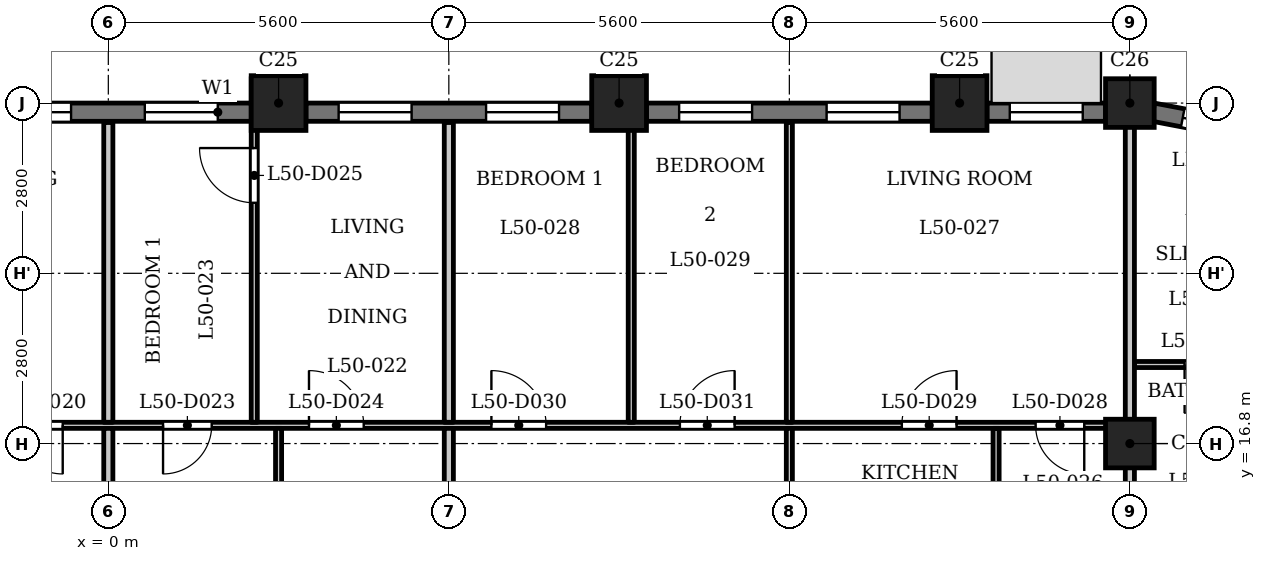
"""IFC4 building model, lengths in metres.
Left out: names, types, materials, properties, quantities, classifications, styles, units other than length and angle.
Written with IfcOpenShell. Run it as: python <this file> out.ifc"""

import sys

from ifc_helpers import new_model, si_unit, direction, frame, frame_2d, origin, origin_2d, place, context, subcontext, project, spatial, rectangle, extrude, element, fill, save


model = new_model("IFC4")
c1 = context("Model", 3, precision=1e-05, world=origin(), true_north=direction((0.0, 1.0)))
c2 = subcontext(c1, "Body", "Model", "MODEL_VIEW")
j1 = project(units=[si_unit("LENGTHUNIT", "METRE"), si_unit("PLANEANGLEUNIT", "RADIAN")], contexts=[c1])
p1 = place(None, origin())
s1 = spatial("IfcSite", under=j1, at=p1, CompositionType="ELEMENT")
p2 = place(p1, origin())
s2 = spatial("IfcBuilding", under=s1, at=p2, CompositionType="ELEMENT")
p3 = place(p2, frame((0.0, 0.0, 195.9)))
s3 = spatial("IfcBuildingStorey", under=s2, at=p3, CompositionType="ELEMENT", Elevation=195.9)
for number, where, z_axis, x_axis in (
    (1, (14.0, 22.4, 0.0), (0.0, 0.0, 1.0), (1.0, 0.0, 0.0)),
    (2, (8.4, 22.4, 0.0), (0.0, 0.0, 1.0), (1.0, 0.0, 0.0)),
    (3, (2.8, 22.4, 0.0), (0.0, 0.0, 1.0), (1.0, 0.0, 0.0)),
):
    element("IfcColumn", number, at=place(p3, frame(where, z_axis=z_axis, x_axis=x_axis)), inside=s3, PredefinedType="COLUMN", context=c2, shape_type="SweptSolid", body=[
        extrude(rectangle(XDim=0.9, YDim=0.9, at=origin_2d()), origin(), (0.0, 0.0, 1.0), 3.5),
    ])
for number, where, z_axis, x_axis in (
    (4, (16.8, 16.8, 0.0), (0.0, 0.0, 1.0), (1.0, 0.0, 0.0)),
    (5, (16.8, 22.4, 0.0), (0.0, 0.0, 1.0), (1.0, 0.0, 0.0)),
):
    element("IfcColumn", number, at=place(p3, frame(where, z_axis=z_axis, x_axis=x_axis)), inside=s3, PredefinedType="COLUMN", context=c2, shape_type="SweptSolid", body=[
        extrude(rectangle(XDim=0.8, YDim=0.8, at=origin_2d()), origin(), (0.0, 0.0, 1.0), 3.5),
    ])
p4 = place(p3, frame((18.946, 21.914, 0.0), z_axis=(0.0, 0.0, 1.0), x_axis=(-0.98230529033, 0.187286722942, 0.0)))
e6 = element("IfcWall", 6, at=p4, inside=s3, PredefinedType="SOLIDWALL", context=c2, shape_type="SweptSolid", body=[
    extrude(rectangle(XDim=1.799, YDim=0.3, at=frame_2d((0.899, 0.0))), origin(), (0.0, 0.0, 1.0), 2.5),
])
p5 = place(p4, frame((0.5, 0.0, 0.6)))
e7 = element("IfcOpeningElement", 7, at=p5, cuts=e6, PredefinedType="OPENING", context=c2, shape_type="SweptSolid", body=[
    extrude(rectangle(XDim=0.8, YDim=1.55, at=frame_2d((0.4, 0.775))), frame((0.0, 0.16, 0.0), z_axis=(0.0, -1.0, 0.0), x_axis=(1.0, 0.0, 0.0)), (0.0, 0.0, 1.0), 0.32),
])
p6 = place(p3, frame((16.4, 22.25, 0.0), z_axis=(0.0, 0.0, 1.0), x_axis=(-1.0, 0.0, 0.0)))
e8 = element("IfcWall", 8, at=p6, inside=s3, PredefinedType="SOLIDWALL", context=c2, shape_type="SweptSolid", body=[
    extrude(rectangle(XDim=1.95, YDim=0.3, at=frame_2d((0.975, 0.0))), origin(), (0.0, 0.0, 1.0), 2.5),
])
p7 = place(p6, frame((0.375, 0.0, 0.6)))
e9 = element("IfcOpeningElement", 9, at=p7, cuts=e8, PredefinedType="OPENING", context=c2, shape_type="SweptSolid", body=[
    extrude(rectangle(XDim=1.2, YDim=1.55, at=frame_2d((0.6, 0.775))), frame((0.0, 0.16, 0.0), z_axis=(0.0, -1.0, 0.0), x_axis=(1.0, 0.0, 0.0)), (0.0, 0.0, 1.0), 0.32),
])
p8 = place(p3, frame((13.55, 22.25, 0.0), z_axis=(0.0, 0.0, 1.0), x_axis=(-1.0, 0.0, 0.0)))
e10 = element("IfcWall", 10, at=p8, inside=s3, PredefinedType="SOLIDWALL", context=c2, shape_type="SweptSolid", body=[
    extrude(rectangle(XDim=4.7, YDim=0.3, at=frame_2d((2.35, 0.0))), origin(), (0.0, 0.0, 1.0), 2.5),
])
p9 = place(p8, frame((0.538, 0.0, 0.6)))
e11 = element("IfcOpeningElement", 11, at=p9, cuts=e10, PredefinedType="OPENING", context=c2, shape_type="SweptSolid", body=[
    extrude(rectangle(XDim=1.2, YDim=1.55, at=frame_2d((0.6, 0.775))), frame((0.0, 0.16, 0.0), z_axis=(0.0, -1.0, 0.0), x_axis=(1.0, 0.0, 0.0)), (0.0, 0.0, 1.0), 0.32),
])
p10 = place(p8, frame((2.962, 0.0, 0.6)))
e12 = element("IfcOpeningElement", 12, at=p10, cuts=e10, PredefinedType="OPENING", context=c2, shape_type="SweptSolid", body=[
    extrude(rectangle(XDim=1.2, YDim=1.55, at=frame_2d((0.6, 0.775))), frame((0.0, 0.16, 0.0), z_axis=(0.0, -1.0, 0.0), x_axis=(1.0, 0.0, 0.0)), (0.0, 0.0, 1.0), 0.32),
])
p11 = place(p3, frame((7.95, 22.25, 0.0), z_axis=(0.0, 0.0, 1.0), x_axis=(-1.0, 0.0, 0.0)))
e13 = element("IfcWall", 13, at=p11, inside=s3, PredefinedType="SOLIDWALL", context=c2, shape_type="SweptSolid", body=[
    extrude(rectangle(XDim=4.7, YDim=0.3, at=frame_2d((2.35, 0.0))), origin(), (0.0, 0.0, 1.0), 2.5),
])
p12 = place(p11, frame((0.538, 0.0, 0.6)))
e14 = element("IfcOpeningElement", 14, at=p12, cuts=e13, PredefinedType="OPENING", context=c2, shape_type="SweptSolid", body=[
    extrude(rectangle(XDim=1.2, YDim=1.55, at=frame_2d((0.6, 0.775))), frame((0.0, 0.16, 0.0), z_axis=(0.0, -1.0, 0.0), x_axis=(1.0, 0.0, 0.0)), (0.0, 0.0, 1.0), 0.32),
])
p13 = place(p11, frame((2.962, 0.0, 0.6)))
e15 = element("IfcOpeningElement", 15, at=p13, cuts=e13, PredefinedType="OPENING", context=c2, shape_type="SweptSolid", body=[
    extrude(rectangle(XDim=1.2, YDim=1.55, at=frame_2d((0.6, 0.775))), frame((0.0, 0.16, 0.0), z_axis=(0.0, -1.0, 0.0), x_axis=(1.0, 0.0, 0.0)), (0.0, 0.0, 1.0), 0.32),
])
p14 = place(p3, frame((2.35, 22.25, 0.0), z_axis=(0.0, 0.0, 1.0), x_axis=(-1.0, 0.0, 0.0)))
e16 = element("IfcWall", 16, at=p14, inside=s3, PredefinedType="SOLIDWALL", context=c2, shape_type="SweptSolid", body=[
    extrude(rectangle(XDim=4.7, YDim=0.3, at=frame_2d((2.35, 0.0))), origin(), (0.0, 0.0, 1.0), 2.5),
])
p15 = place(p14, frame((0.55, 0.0, 0.6)))
e17 = element("IfcOpeningElement", 17, at=p15, cuts=e16, PredefinedType="OPENING", context=c2, shape_type="SweptSolid", body=[
    extrude(rectangle(XDim=1.2, YDim=1.55, at=frame_2d((0.6, 0.775))), frame((0.0, 0.16, 0.0), z_axis=(0.0, -1.0, 0.0), x_axis=(1.0, 0.0, 0.0)), (0.0, 0.0, 1.0), 0.32),
])
p16 = place(p14, frame((2.962, 0.0, 0.6)))
e18 = element("IfcOpeningElement", 18, at=p16, cuts=e16, PredefinedType="OPENING", context=c2, shape_type="SweptSolid", body=[
    extrude(rectangle(XDim=1.2, YDim=1.55, at=frame_2d((0.6, 0.775))), frame((0.0, 0.16, 0.0), z_axis=(0.0, -1.0, 0.0), x_axis=(1.0, 0.0, 0.0)), (0.0, 0.0, 1.0), 0.32),
])
p17 = place(p3, frame((-16.725, 17.1, 0.0), z_axis=(0.0, 0.0, 1.0), x_axis=(1.0, 0.0, 0.0)))
e19 = element("IfcWall", 19, at=p17, inside=s3, PredefinedType="PARTITIONING", context=c2, shape_type="SweptSolid", body=[
    extrude(rectangle(XDim=33.45, YDim=0.1, at=frame_2d((16.725, 0.0))), origin(), (0.0, 0.0, 1.0), 3.2),
])
p18 = place(p17, frame((4.075, 0.0, 0.0)))
e20 = element("IfcOpeningElement", 20, at=p18, cuts=e19, PredefinedType="OPENING", context=c2, shape_type="SweptSolid", body=[
    extrude(rectangle(XDim=0.8, YDim=2.1, at=frame_2d((0.4, 1.05))), frame((0.0, 0.06, 0.0), z_axis=(0.0, -1.0, 0.0), x_axis=(1.0, 0.0, 0.0)), (0.0, 0.0, 1.0), 0.12),
])
p19 = place(p17, frame((9.575, 0.0, 0.0)))
e21 = element("IfcOpeningElement", 21, at=p19, cuts=e19, PredefinedType="OPENING", context=c2, shape_type="SweptSolid", body=[
    extrude(rectangle(XDim=0.9, YDim=2.1, at=frame_2d((0.45, 1.05))), frame((0.0, 0.06, 0.0), z_axis=(0.0, -1.0, 0.0), x_axis=(1.0, 0.0, 0.0)), (0.0, 0.0, 1.0), 0.12),
])
p20 = place(p17, frame((15.175, 0.0, 0.0)))
e22 = element("IfcOpeningElement", 22, at=p20, cuts=e19, PredefinedType="OPENING", context=c2, shape_type="SweptSolid", body=[
    extrude(rectangle(XDim=0.8, YDim=2.1, at=frame_2d((0.4, 1.05))), frame((0.0, 0.06, 0.0), z_axis=(0.0, -1.0, 0.0), x_axis=(1.0, 0.0, 0.0)), (0.0, 0.0, 1.0), 0.12),
])
p21 = place(p17, frame((12.975, 0.0, 0.0)))
e23 = element("IfcOpeningElement", 23, at=p21, cuts=e19, PredefinedType="OPENING", context=c2, shape_type="SweptSolid", body=[
    extrude(rectangle(XDim=0.9, YDim=2.1, at=frame_2d((0.45, 1.05))), frame((0.0, 0.06, 0.0), z_axis=(0.0, -1.0, 0.0), x_axis=(1.0, 0.0, 0.0)), (0.0, 0.0, 1.0), 0.12),
])
p22 = place(p17, frame((17.625, 0.0, 0.0)))
e24 = element("IfcOpeningElement", 24, at=p22, cuts=e19, PredefinedType="OPENING", context=c2, shape_type="SweptSolid", body=[
    extrude(rectangle(XDim=0.8, YDim=2.1, at=frame_2d((0.4, 1.05))), frame((0.0, 0.06, 0.0), z_axis=(0.0, -1.0, 0.0), x_axis=(1.0, 0.0, 0.0)), (0.0, 0.0, 1.0), 0.12),
])
p23 = place(p17, frame((20.025, 0.0, 0.0)))
e25 = element("IfcOpeningElement", 25, at=p23, cuts=e19, PredefinedType="OPENING", context=c2, shape_type="SweptSolid", body=[
    extrude(rectangle(XDim=0.9, YDim=2.1, at=frame_2d((0.45, 1.05))), frame((0.0, 0.06, 0.0), z_axis=(0.0, -1.0, 0.0), x_axis=(1.0, 0.0, 0.0)), (0.0, 0.0, 1.0), 0.12),
])
p24 = place(p17, frame((31.975, 0.0, 0.0)))
e26 = element("IfcOpeningElement", 26, at=p24, cuts=e19, PredefinedType="OPENING", context=c2, shape_type="SweptSolid", body=[
    extrude(rectangle(XDim=0.8, YDim=2.1, at=frame_2d((0.4, 1.05))), frame((0.0, 0.06, 0.0), z_axis=(0.0, -1.0, 0.0), x_axis=(1.0, 0.0, 0.0)), (0.0, 0.0, 1.0), 0.12),
])
p25 = place(p17, frame((29.775, 0.0, 0.0)))
e27 = element("IfcOpeningElement", 27, at=p25, cuts=e19, PredefinedType="OPENING", context=c2, shape_type="SweptSolid", body=[
    extrude(rectangle(XDim=0.9, YDim=2.1, at=frame_2d((0.45, 1.05))), frame((0.0, 0.06, 0.0), z_axis=(0.0, -1.0, 0.0), x_axis=(1.0, 0.0, 0.0)), (0.0, 0.0, 1.0), 0.12),
])
p26 = place(p17, frame((23.025, 0.0, 0.0)))
e28 = element("IfcOpeningElement", 28, at=p26, cuts=e19, PredefinedType="OPENING", context=c2, shape_type="SweptSolid", body=[
    extrude(rectangle(XDim=0.9, YDim=2.1, at=frame_2d((0.45, 1.05))), frame((0.0, 0.06, 0.0), z_axis=(0.0, -1.0, 0.0), x_axis=(1.0, 0.0, 0.0)), (0.0, 0.0, 1.0), 0.12),
])
p27 = place(p17, frame((26.125, 0.0, 0.0)))
e29 = element("IfcOpeningElement", 29, at=p27, cuts=e19, PredefinedType="OPENING", context=c2, shape_type="SweptSolid", body=[
    extrude(rectangle(XDim=0.9, YDim=2.1, at=frame_2d((0.45, 1.05))), frame((0.0, 0.06, 0.0), z_axis=(0.0, -1.0, 0.0), x_axis=(1.0, 0.0, 0.0)), (0.0, 0.0, 1.0), 0.12),
])
p28 = place(p3, frame((16.875, 18.1, 0.0), z_axis=(0.0, 0.0, 1.0), x_axis=(1.0, 0.0, 0.0)))
e30 = element("IfcWall", 30, at=p28, inside=s3, PredefinedType="PARTITIONING", context=c2, shape_type="SweptSolid", body=[
    extrude(rectangle(XDim=6.515, YDim=0.1, at=frame_2d((3.258, 0.0))), origin(), (0.0, 0.0, 1.0), 3.2),
])
p29 = place(p28, frame((0.825, 0.0, 0.0)))
e31 = element("IfcOpeningElement", 31, at=p29, cuts=e30, PredefinedType="OPENING", context=c2, shape_type="SweptSolid", body=[
    extrude(rectangle(XDim=0.8, YDim=2.1, at=frame_2d((0.4, 1.05))), frame((0.0, 0.06, 0.0), z_axis=(0.0, -1.0, 0.0), x_axis=(1.0, 0.0, 0.0)), (0.0, 0.0, 1.0), 0.12),
])
p30 = place(p28, frame((3.239, 0.0, 0.0)))
e32 = element("IfcOpeningElement", 32, at=p30, cuts=e30, PredefinedType="OPENING", context=c2, shape_type="SweptSolid", body=[
    extrude(rectangle(XDim=0.9, YDim=2.1, at=frame_2d((0.45, 1.05))), frame((0.0, 0.06, 0.0), z_axis=(0.0, -1.0, 0.0), x_axis=(1.0, 0.0, 0.0)), (0.0, 0.0, 1.0), 0.12),
])
p31 = place(p3, frame((0.0, 13.275, 0.0), z_axis=(0.0, 0.0, 1.0), x_axis=(0.0, 1.0, 0.0)))
e33 = element("IfcWall", 33, at=p31, inside=s3, PredefinedType="PARTITIONING", context=c2, shape_type="SweptSolid", body=[
    extrude(rectangle(XDim=3.775, YDim=0.15, at=frame_2d((1.888, 0.0))), origin(), (0.0, 0.0, 1.0), 3.2),
])
p32 = place(p3, frame((0.0, 17.15, 0.0), z_axis=(0.0, 0.0, 1.0), x_axis=(0.0, 1.0, 0.0)))
e34 = element("IfcWall", 34, at=p32, inside=s3, PredefinedType="PARTITIONING", context=c2, shape_type="SweptSolid", body=[
    extrude(rectangle(XDim=4.93, YDim=0.15, at=frame_2d((2.465, 0.0))), origin(), (0.0, 0.0, 1.0), 3.2),
])
p33 = place(p3, frame((2.4, 17.15, 0.0), z_axis=(0.0, 0.0, 1.0), x_axis=(0.0, 1.0, 0.0)))
e35 = element("IfcWall", 35, at=p33, inside=s3, PredefinedType="PARTITIONING", context=c2, shape_type="SweptSolid", body=[
    extrude(rectangle(XDim=5.68, YDim=0.1, at=frame_2d((2.84, 0.0))), origin(), (0.0, 0.0, 1.0), 3.2),
])
p34 = place(p33, frame((3.61, 0.0, 0.0)))
e36 = element("IfcOpeningElement", 36, at=p34, cuts=e35, PredefinedType="OPENING", context=c2, shape_type="SweptSolid", body=[
    extrude(rectangle(XDim=0.9, YDim=2.1, at=frame_2d((0.45, 1.05))), frame((0.0, 0.06, 0.0), z_axis=(0.0, -1.0, 0.0), x_axis=(1.0, 0.0, 0.0)), (0.0, 0.0, 1.0), 0.12),
])
p35 = place(p3, frame((2.8, 13.275, 0.0), z_axis=(0.0, 0.0, 1.0), x_axis=(0.0, 1.0, 0.0)))
e37 = element("IfcWall", 37, at=p35, inside=s3, PredefinedType="PARTITIONING", context=c2, shape_type="SweptSolid", body=[
    extrude(rectangle(XDim=3.775, YDim=0.1, at=frame_2d((1.888, 0.0))), origin(), (0.0, 0.0, 1.0), 3.2),
])
p36 = place(p3, frame((5.6, 13.275, 0.0), z_axis=(0.0, 0.0, 1.0), x_axis=(0.0, 1.0, 0.0)))
e38 = element("IfcWall", 38, at=p36, inside=s3, PredefinedType="PARTITIONING", context=c2, shape_type="SweptSolid", body=[
    extrude(rectangle(XDim=3.775, YDim=0.15, at=frame_2d((1.888, 0.0))), origin(), (0.0, 0.0, 1.0), 3.2),
])
p37 = place(p3, frame((5.6, 17.15, 0.0), z_axis=(0.0, 0.0, 1.0), x_axis=(0.0, 1.0, 0.0)))
e39 = element("IfcWall", 39, at=p37, inside=s3, PredefinedType="PARTITIONING", context=c2, shape_type="SweptSolid", body=[
    extrude(rectangle(XDim=4.93, YDim=0.15, at=frame_2d((2.465, 0.0))), origin(), (0.0, 0.0, 1.0), 3.2),
])
p38 = place(p3, frame((8.6, 17.15, 0.0), z_axis=(0.0, 0.0, 1.0), x_axis=(0.0, 1.0, 0.0)))
e40 = element("IfcWall", 40, at=p38, inside=s3, PredefinedType="PARTITIONING", context=c2, shape_type="SweptSolid", body=[
    extrude(rectangle(XDim=5.68, YDim=0.1, at=frame_2d((2.84, 0.0))), origin(), (0.0, 0.0, 1.0), 3.2),
])
p39 = place(p3, frame((11.2, 13.275, 0.0), z_axis=(0.0, 0.0, 1.0), x_axis=(0.0, 1.0, 0.0)))
e41 = element("IfcWall", 41, at=p39, inside=s3, PredefinedType="PARTITIONING", context=c2, shape_type="SweptSolid", body=[
    extrude(rectangle(XDim=3.775, YDim=0.1, at=frame_2d((1.888, 0.0))), origin(), (0.0, 0.0, 1.0), 3.2),
])
p40 = place(p39, frame((0.576, 0.0, 0.0)))
e42 = element("IfcOpeningElement", 42, at=p40, cuts=e41, PredefinedType="OPENING", context=c2, shape_type="SweptSolid", body=[
    extrude(rectangle(XDim=0.9, YDim=2.1, at=frame_2d((0.45, 1.05))), frame((0.0, 0.06, 0.0), z_axis=(0.0, -1.0, 0.0), x_axis=(1.0, 0.0, 0.0)), (0.0, 0.0, 1.0), 0.12),
])
p41 = place(p3, frame((11.2, 17.15, 0.0), z_axis=(0.0, 0.0, 1.0), x_axis=(0.0, 1.0, 0.0)))
e43 = element("IfcWall", 43, at=p41, inside=s3, PredefinedType="PARTITIONING", context=c2, shape_type="SweptSolid", body=[
    extrude(rectangle(XDim=4.93, YDim=0.1, at=frame_2d((2.465, 0.0))), origin(), (0.0, 0.0, 1.0), 3.2),
])
p42 = place(p3, frame((14.6, 13.275, 0.0), z_axis=(0.0, 0.0, 1.0), x_axis=(0.0, 1.0, 0.0)))
e44 = element("IfcWall", 44, at=p42, inside=s3, PredefinedType="PARTITIONING", context=c2, shape_type="SweptSolid", body=[
    extrude(rectangle(XDim=3.775, YDim=0.1, at=frame_2d((1.888, 0.0))), origin(), (0.0, 0.0, 1.0), 3.2),
])
p43 = place(p3, frame((16.8, 15.475, 0.0), z_axis=(0.0, 0.0, 1.0), x_axis=(0.0, 1.0, 0.0)))
e45 = element("IfcWall", 45, at=p43, inside=s3, PredefinedType="PARTITIONING", context=c2, shape_type="SweptSolid", body=[
    extrude(rectangle(XDim=6.835, YDim=0.15, at=frame_2d((3.417, 0.0))), origin(), (0.0, 0.0, 1.0), 2.55),
])
p44 = place(p20, origin())
e46 = element("IfcDoor", 46, at=p44, inside=s3, OperationType="SINGLE_SWING_RIGHT", PredefinedType="DOOR", context=c2, shape_type="SweptSolid", body=[
    extrude(rectangle(XDim=0.8, YDim=2.1, at=frame_2d((0.4, 1.05))), frame((0.0, 0.025, 0.0), z_axis=(0.0, -1.0, 0.0), x_axis=(1.0, 0.0, 0.0)), (0.0, 0.0, 1.0), 0.05),
])
fill(e22, e46)
p45 = place(p22, origin())
e47 = element("IfcDoor", 47, at=p45, inside=s3, OperationType="SINGLE_SWING_LEFT", PredefinedType="DOOR", context=c2, shape_type="SweptSolid", body=[
    extrude(rectangle(XDim=0.8, YDim=2.1, at=frame_2d((0.4, 1.05))), frame((0.0, 0.025, 0.0), z_axis=(0.0, -1.0, 0.0), x_axis=(1.0, 0.0, 0.0)), (0.0, 0.0, 1.0), 0.05),
])
fill(e24, e47)
p46 = place(p23, origin())
e48 = element("IfcDoor", 48, at=p46, inside=s3, OperationType="SINGLE_SWING_RIGHT", PredefinedType="DOOR", context=c2, shape_type="SweptSolid", body=[
    extrude(rectangle(XDim=0.9, YDim=2.1, at=frame_2d((0.45, 1.05))), frame((0.0, 0.025, 0.0), z_axis=(0.0, -1.0, 0.0), x_axis=(1.0, 0.0, 0.0)), (0.0, 0.0, 1.0), 0.05),
])
fill(e25, e48)
p47 = place(p34, origin())
e49 = element("IfcDoor", 49, at=p47, inside=s3, OperationType="SINGLE_SWING_LEFT", PredefinedType="DOOR", context=c2, shape_type="SweptSolid", body=[
    extrude(rectangle(XDim=0.9, YDim=2.1, at=frame_2d((0.45, 1.05))), frame((0.0, 0.025, 0.0), z_axis=(0.0, -1.0, 0.0), x_axis=(1.0, 0.0, 0.0)), (0.0, 0.0, 1.0), 0.05),
])
fill(e36, e49)
p48 = place(p24, origin())
e50 = element("IfcDoor", 50, at=p48, inside=s3, OperationType="SINGLE_SWING_RIGHT", PredefinedType="DOOR", context=c2, shape_type="SweptSolid", body=[
    extrude(rectangle(XDim=0.8, YDim=2.1, at=frame_2d((0.4, 1.05))), frame((0.0, 0.025, 0.0), z_axis=(0.0, -1.0, 0.0), x_axis=(1.0, 0.0, 0.0)), (0.0, 0.0, 1.0), 0.05),
])
fill(e26, e50)
p49 = place(p25, origin())
e51 = element("IfcDoor", 51, at=p49, inside=s3, OperationType="SINGLE_SWING_LEFT", PredefinedType="DOOR", context=c2, shape_type="SweptSolid", body=[
    extrude(rectangle(XDim=0.9, YDim=2.1, at=frame_2d((0.45, 1.05))), frame((0.0, 0.025, 0.0), z_axis=(0.0, -1.0, 0.0), x_axis=(1.0, 0.0, 0.0)), (0.0, 0.0, 1.0), 0.05),
])
fill(e27, e51)
p50 = place(p26, origin())
e52 = element("IfcDoor", 52, at=p50, inside=s3, OperationType="SINGLE_SWING_RIGHT", PredefinedType="DOOR", context=c2, shape_type="SweptSolid", body=[
    extrude(rectangle(XDim=0.9, YDim=2.1, at=frame_2d((0.45, 1.05))), frame((0.0, 0.025, 0.0), z_axis=(0.0, -1.0, 0.0), x_axis=(1.0, 0.0, 0.0)), (0.0, 0.0, 1.0), 0.05),
])
fill(e28, e52)
p51 = place(p27, origin())
e53 = element("IfcDoor", 53, at=p51, inside=s3, OperationType="SINGLE_SWING_LEFT", PredefinedType="DOOR", context=c2, shape_type="SweptSolid", body=[
    extrude(rectangle(XDim=0.9, YDim=2.1, at=frame_2d((0.45, 1.05))), frame((0.0, 0.025, 0.0), z_axis=(0.0, -1.0, 0.0), x_axis=(1.0, 0.0, 0.0)), (0.0, 0.0, 1.0), 0.05),
])
fill(e29, e53)
p52 = place(p29, origin())
e54 = element("IfcDoor", 54, at=p52, inside=s3, OperationType="SINGLE_SWING_LEFT", PredefinedType="DOOR", context=c2, shape_type="SweptSolid", body=[
    extrude(rectangle(XDim=0.8, YDim=2.1, at=frame_2d((0.4, 1.05))), frame((0.0, 0.025, 0.0), z_axis=(0.0, -1.0, 0.0), x_axis=(1.0, 0.0, 0.0)), (0.0, 0.0, 1.0), 0.05),
])
fill(e31, e54)
p53 = place(p5, origin())
e55 = element("IfcWindow", 55, at=p53, inside=s3, PartitioningType="SINGLE_PANEL", PredefinedType="WINDOW", context=c2, shape_type="SweptSolid", body=[
    extrude(rectangle(XDim=0.8, YDim=1.55, at=frame_2d((0.4, 0.775))), frame((0.0, 0.03, 0.0), z_axis=(0.0, -1.0, 0.0), x_axis=(1.0, 0.0, 0.0)), (0.0, 0.0, 1.0), 0.06),
])
fill(e7, e55)
p54 = place(p7, origin())
e56 = element("IfcWindow", 56, at=p54, inside=s3, PartitioningType="SINGLE_PANEL", PredefinedType="WINDOW", context=c2, shape_type="SweptSolid", body=[
    extrude(rectangle(XDim=1.2, YDim=1.55, at=frame_2d((0.6, 0.775))), frame((0.0, 0.03, 0.0), z_axis=(0.0, -1.0, 0.0), x_axis=(1.0, 0.0, 0.0)), (0.0, 0.0, 1.0), 0.06),
])
fill(e9, e56)
p55 = place(p9, origin())
e57 = element("IfcWindow", 57, at=p55, inside=s3, PartitioningType="SINGLE_PANEL", PredefinedType="WINDOW", context=c2, shape_type="SweptSolid", body=[
    extrude(rectangle(XDim=1.2, YDim=1.55, at=frame_2d((0.6, 0.775))), frame((0.0, 0.03, 0.0), z_axis=(0.0, -1.0, 0.0), x_axis=(1.0, 0.0, 0.0)), (0.0, 0.0, 1.0), 0.06),
])
fill(e11, e57)
p56 = place(p10, origin())
e58 = element("IfcWindow", 58, at=p56, inside=s3, PartitioningType="SINGLE_PANEL", PredefinedType="WINDOW", context=c2, shape_type="SweptSolid", body=[
    extrude(rectangle(XDim=1.2, YDim=1.55, at=frame_2d((0.6, 0.775))), frame((0.0, 0.03, 0.0), z_axis=(0.0, -1.0, 0.0), x_axis=(1.0, 0.0, 0.0)), (0.0, 0.0, 1.0), 0.06),
])
fill(e12, e58)
p57 = place(p12, origin())
e59 = element("IfcWindow", 59, at=p57, inside=s3, PartitioningType="SINGLE_PANEL", PredefinedType="WINDOW", context=c2, shape_type="SweptSolid", body=[
    extrude(rectangle(XDim=1.2, YDim=1.55, at=frame_2d((0.6, 0.775))), frame((0.0, 0.03, 0.0), z_axis=(0.0, -1.0, 0.0), x_axis=(1.0, 0.0, 0.0)), (0.0, 0.0, 1.0), 0.06),
])
fill(e14, e59)
p58 = place(p13, origin())
e60 = element("IfcWindow", 60, at=p58, inside=s3, PartitioningType="SINGLE_PANEL", PredefinedType="WINDOW", context=c2, shape_type="SweptSolid", body=[
    extrude(rectangle(XDim=1.2, YDim=1.55, at=frame_2d((0.6, 0.775))), frame((0.0, 0.03, 0.0), z_axis=(0.0, -1.0, 0.0), x_axis=(1.0, 0.0, 0.0)), (0.0, 0.0, 1.0), 0.06),
])
fill(e15, e60)
p59 = place(p15, origin())
e61 = element("IfcWindow", 61, at=p59, inside=s3, PartitioningType="SINGLE_PANEL", PredefinedType="WINDOW", context=c2, shape_type="SweptSolid", body=[
    extrude(rectangle(XDim=1.2, YDim=1.55, at=frame_2d((0.6, 0.775))), frame((0.0, 0.03, 0.0), z_axis=(0.0, -1.0, 0.0), x_axis=(1.0, 0.0, 0.0)), (0.0, 0.0, 1.0), 0.06),
])
fill(e17, e61)
p60 = place(p16, origin())
e62 = element("IfcWindow", 62, at=p60, inside=s3, PartitioningType="SINGLE_PANEL", PredefinedType="WINDOW", context=c2, shape_type="SweptSolid", body=[
    extrude(rectangle(XDim=1.2, YDim=1.55, at=frame_2d((0.6, 0.775))), frame((0.0, 0.03, 0.0), z_axis=(0.0, -1.0, 0.0), x_axis=(1.0, 0.0, 0.0)), (0.0, 0.0, 1.0), 0.06),
])
fill(e18, e62)
save(model, sys.argv[1])
